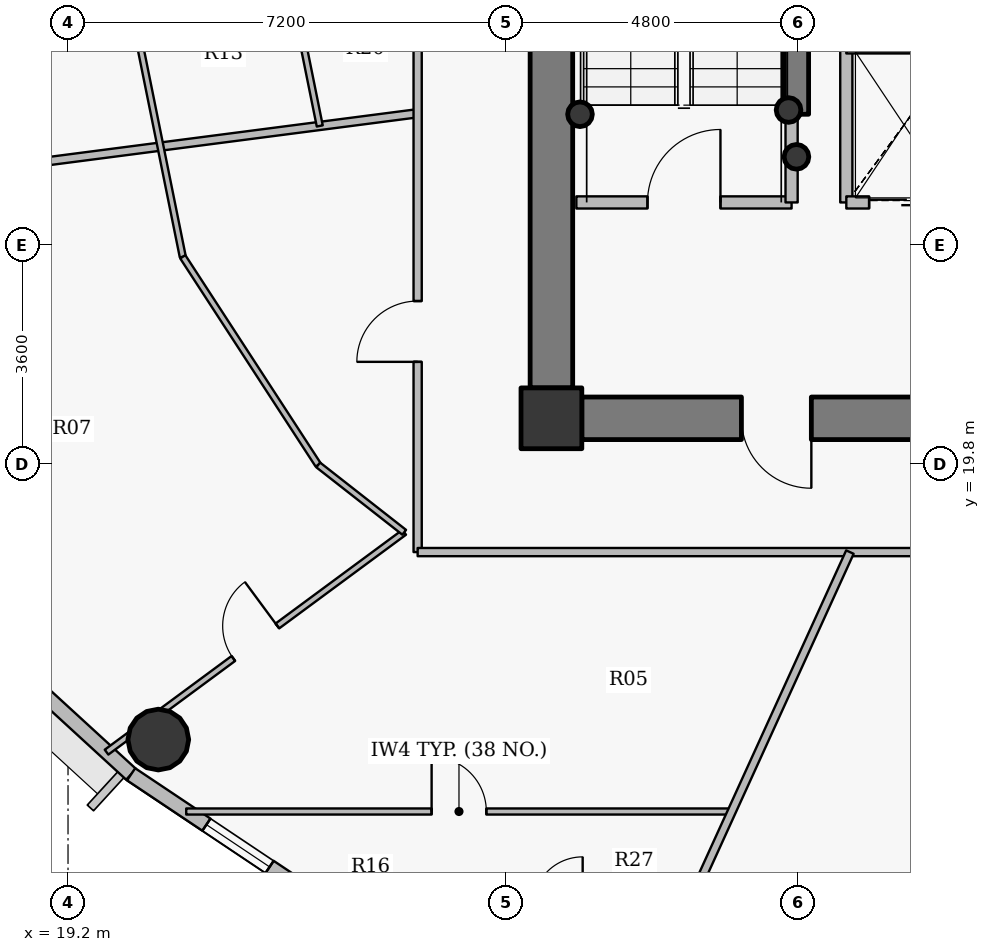
"""IFC4 building model, lengths in metres.
Left out: names, types, materials, properties, quantities, classifications, styles, units other than length and angle.
Written with IfcOpenShell. Run it as: python <this file> out.ifc"""

import sys

from ifc_helpers import new_model, si_unit, direction, frame, frame_2d, origin, origin_2d, place, context, subcontext, project, spatial, rectangle, hollow_circle, extrude, source, transform, mapped, element, fill, save


model = new_model("IFC4")
c1 = context("Model", 3, precision=1e-05, world=origin(), true_north=direction((0.0, 1.0)))
c2 = subcontext(c1, "Body", "Model", "MODEL_VIEW")
j1 = project(units=[si_unit("LENGTHUNIT", "METRE"), si_unit("PLANEANGLEUNIT", "RADIAN")], contexts=[c1])
p1 = place(None, origin())
s1 = spatial("IfcSite", under=j1, at=p1, CompositionType="ELEMENT")
p2 = place(p1, origin())
s2 = spatial("IfcBuilding", under=s1, at=p2, CompositionType="ELEMENT")
p3 = place(p2, frame((0.0, 0.0, 299.25)))
s3 = spatial("IfcBuildingStorey", under=s2, at=p3, CompositionType="ELEMENT", Elevation=299.25)
p4 = place(p3, frame((27.15, 20.55, 0.0), z_axis=(0.0, 0.0, 1.0), x_axis=(1.0, 0.0, 0.0)))
e1 = element("IfcColumn", 1, at=p4, inside=s3, PredefinedType="COLUMN", context=c2, shape_type="SweptSolid", body=[
    extrude(rectangle(XDim=1.0, YDim=1.0, at=origin_2d()), origin(), (0.0, 0.0, 1.0), 3.75),
])
for number, where, z_axis, x_axis in (
    (2, (31.05, 25.62, 0.0), (0.0, 0.0, 1.0), (1.0, 0.0, 0.0)),
    (3, (31.18, 24.85, 0.0), (0.0, 0.0, 1.0), (1.0, 0.0, 0.0)),
    (4, (27.62, 25.55, 0.0), (0.0, 0.0, 1.0), (1.0, 0.0, 0.0)),
):
    element("IfcColumn", number, at=place(p3, frame(where, z_axis=z_axis, x_axis=x_axis)), inside=s3, PredefinedType="COLUMN", context=c2, shape_type="SweptSolid", body=[
        extrude(hollow_circle(Radius=0.203, WallThickness=0.016, at=origin_2d()), origin(), (0.0, 0.0, 1.0), 3.75),
    ])
p5 = place(p3, frame((44.35, 20.55, 0.0), z_axis=(0.0, 0.0, 1.0), x_axis=(-1.0, 0.0, 0.0)))
e5 = element("IfcWall", 5, at=p5, inside=s3, PredefinedType="SHEAR", context=c2, shape_type="SweptSolid", body=[
    extrude(rectangle(XDim=16.7, YDim=0.7, at=frame_2d((8.35, 0.0))), origin(), (0.0, 0.0, 1.0), 3.05),
])
p6 = place(p5, frame((12.925, 0.0, 0.0)))
e6 = element("IfcOpeningElement", 6, at=p6, cuts=e5, PredefinedType="OPENING", context=c2, shape_type="SweptSolid", body=[
    extrude(rectangle(XDim=1.15, YDim=2.15, at=origin_2d()), frame((0.575, 0.36, 1.075), z_axis=(0.0, -1.0, 0.0), x_axis=(1.0, 0.0, 0.0)), (0.0, 0.0, 1.0), 0.72),
])
p7 = place(p5, frame((9.1, 0.0, 0.0)))
e7 = element("IfcOpeningElement", 7, at=p7, cuts=e5, PredefinedType="OPENING", context=c2, shape_type="SweptSolid", body=[
    extrude(rectangle(XDim=1.15, YDim=2.15, at=origin_2d()), frame((0.575, 0.36, 1.075), z_axis=(0.0, -1.0, 0.0), x_axis=(1.0, 0.0, 0.0)), (0.0, 0.0, 1.0), 0.72),
])
p8 = place(p3, frame((27.15, 21.05, 0.0), z_axis=(0.0, 0.0, 1.0), x_axis=(0.0, 1.0, 0.0)))
e8 = element("IfcWall", 8, at=p8, inside=s3, PredefinedType="SHEAR", context=c2, shape_type="SweptSolid", body=[
    extrude(rectangle(XDim=11.9, YDim=0.7, at=frame_2d((5.95, 0.0))), origin(), (0.0, 0.0, 1.0), 3.05),
])
p9 = place(p3, frame((31.18, 25.55, 0.0), z_axis=(0.0, 0.0, 1.0), x_axis=(0.0, 1.0, 0.0)))
e9 = element("IfcWall", 9, at=p9, inside=s3, PredefinedType="SHEAR", context=c2, shape_type="SweptSolid", body=[
    extrude(rectangle(XDim=2.25, YDim=0.4, at=frame_2d((1.125, 0.0))), origin(), (0.0, 0.0, 1.0), 3.1),
])
p10 = place(p3, frame((20.685, 15.267, 0.0), z_axis=(0.0, 0.0, 1.0), x_axis=(1.0, 0.0, 0.0)))
e10 = element("IfcColumn", 10, at=p10, inside=s3, PredefinedType="COLUMN", context=c2, shape_type="SweptSolid", body=[
    extrude(hollow_circle(Radius=0.5, WallThickness=0.032, at=origin_2d()), origin(), (0.0, 0.0, 1.0), 3.75),
])
p11 = place(p3, frame((20.238, 14.696, 0.0), z_axis=(0.0, 0.0, 1.0), x_axis=(-0.737068506972, 0.675818034703, 0.0)))
e11 = element("IfcWall", 11, at=p11, inside=s3, PredefinedType="SOLIDWALL", context=c2, shape_type="SweptSolid", body=[
    extrude(rectangle(XDim=3.077, YDim=0.24, at=frame_2d((1.539, 0.0))), origin(), (0.0, 0.0, 1.0), 3.5),
])
p12 = place(p3, frame((22.896, 12.918, 0.0), z_axis=(0.0, 0.0, 1.0), x_axis=(-0.831250592635, 0.55589787933, 0.0)))
e12 = element("IfcWall", 12, at=p12, inside=s3, PredefinedType="SOLIDWALL", context=c2, shape_type="SweptSolid", body=[
    extrude(rectangle(XDim=3.197, YDim=0.24, at=frame_2d((1.599, 0.0))), origin(), (0.0, 0.0, 1.0), 3.5),
])
p13 = place(p12, frame((0.458, 0.0, 0.9)))
e13 = element("IfcOpeningElement", 13, at=p13, cuts=e12, PredefinedType="OPENING", context=c2, shape_type="SweptSolid", body=[
    extrude(rectangle(XDim=1.25, YDim=1.65, at=origin_2d()), frame((0.625, 0.13, 0.825), z_axis=(0.0, -1.0, 0.0), x_axis=(1.0, 0.0, 0.0)), (0.0, 0.0, 1.0), 0.26),
])
p14 = place(p3, frame((14.033, 24.151, 0.0), z_axis=(0.0, 0.0, 1.0), x_axis=(0.99169266035, 0.128629963101, 0.0)))
e14 = element("IfcWall", 14, at=p14, inside=s3, PredefinedType="PARTITIONING", context=c2, shape_type="SweptSolid", body=[
    extrude(rectangle(XDim=11.009, YDim=0.135, at=frame_2d((5.504, 0.0))), origin(), (0.0, 0.0, 1.0), 2.985),
])
p15 = place(p3, frame((19.833, 15.06, 0.0), z_axis=(0.0, 0.0, 1.0), x_axis=(0.804387847123, 0.594104529019, 0.0)))
e15 = element("IfcWall", 15, at=p15, inside=s3, PredefinedType="PARTITIONING", context=c2, shape_type="SweptSolid", body=[
    extrude(rectangle(XDim=6.086, YDim=0.1, at=frame_2d((3.043, 0.0))), origin(), (0.0, 0.0, 1.0), 3.5),
])
p16 = place(p15, frame((2.593, 0.0, 0.0)))
e16 = element("IfcOpeningElement", 16, at=p16, cuts=e15, PredefinedType="OPENING", context=c2, shape_type="SweptSolid", body=[
    extrude(rectangle(XDim=0.9, YDim=2.1, at=origin_2d()), frame((0.45, 0.06, 1.05), z_axis=(0.0, -1.0, 0.0), x_axis=(1.0, 0.0, 0.0)), (0.0, 0.0, 1.0), 0.12),
])
p17 = place(p3, frame((20.32, 27.0, 0.0), z_axis=(0.0, 0.0, 1.0), x_axis=(0.198226068862, -0.980156327135, 0.0)))
e17 = element("IfcWall", 17, at=p17, inside=s3, PredefinedType="PARTITIONING", context=c2, shape_type="SweptSolid", body=[
    extrude(rectangle(XDim=3.871, YDim=0.1, at=frame_2d((1.936, 0.0))), origin(), (0.0, 0.0, 1.0), 3.035),
])
p18 = place(p3, frame((21.087, 23.206, 0.0), z_axis=(0.0, 0.0, 1.0), x_axis=(0.545435886628, -0.838152547916, 0.0)))
e18 = element("IfcWall", 18, at=p18, inside=s3, PredefinedType="PARTITIONING", context=c2, shape_type="SweptSolid", body=[
    extrude(rectangle(XDim=4.083, YDim=0.1, at=frame_2d((2.042, 0.0))), origin(), (0.0, 0.0, 1.0), 3.035),
])
p19 = place(p3, frame((21.144, 14.084, 0.0), z_axis=(0.0, 0.0, 1.0), x_axis=(1.0, 0.0, 0.0)))
e19 = element("IfcWall", 19, at=p19, inside=s3, PredefinedType="PARTITIONING", context=c2, shape_type="SweptSolid", body=[
    extrude(rectangle(XDim=8.971, YDim=0.1, at=frame_2d((4.486, 0.0))), origin(), (0.0, 0.0, 1.0), 2.985),
])
p20 = place(p19, frame((4.036, 0.0, 0.0)))
e20 = element("IfcOpeningElement", 20, at=p20, cuts=e19, PredefinedType="OPENING", context=c2, shape_type="SweptSolid", body=[
    extrude(rectangle(XDim=0.9, YDim=2.1, at=origin_2d()), frame((0.45, 0.06, 1.05), z_axis=(0.0, -1.0, 0.0), x_axis=(1.0, 0.0, 0.0)), (0.0, 0.0, 1.0), 0.12),
])
p21 = place(p3, frame((23.008, 27.0, 0.0), z_axis=(0.0, 0.0, 1.0), x_axis=(0.198189512146, -0.980163719628, 0.0)))
e21 = element("IfcWall", 21, at=p21, inside=s3, PredefinedType="PARTITIONING", context=c2, shape_type="SweptSolid", body=[
    extrude(rectangle(XDim=1.675, YDim=0.1, at=frame_2d((0.838, 0.0))), origin(), (0.0, 0.0, 1.0), 3.035),
])
p22 = place(p3, frame((23.315, 19.783, 0.0), z_axis=(0.0, 0.0, 1.0), x_axis=(0.787284128546, -0.616590383431, 0.0)))
e22 = element("IfcWall", 22, at=p22, inside=s3, PredefinedType="PARTITIONING", context=c2, shape_type="SweptSolid", body=[
    extrude(rectangle(XDim=1.796, YDim=0.1, at=frame_2d((0.898, 0.0))), origin(), (0.0, 0.0, 1.0), 3.5),
])
p23 = place(p3, frame((24.95, 18.35, 0.0), z_axis=(0.0, 0.0, 1.0), x_axis=(0.0, 1.0, 0.0)))
e23 = element("IfcWall", 23, at=p23, inside=s3, PredefinedType="PARTITIONING", context=c2, shape_type="SweptSolid", body=[
    extrude(rectangle(XDim=11.45, YDim=0.135, at=frame_2d((5.725, 0.0))), origin(), (0.0, 0.0, 1.0), 3.035),
])
p24 = place(p23, frame((3.128, 0.0, 0.0)))
e24 = element("IfcOpeningElement", 24, at=p24, cuts=e23, PredefinedType="OPENING", context=c2, shape_type="SweptSolid", body=[
    extrude(rectangle(XDim=1.0, YDim=2.15, at=origin_2d()), frame((0.5, 0.078, 1.075), z_axis=(0.0, -1.0, 0.0), x_axis=(1.0, 0.0, 0.0)), (0.0, 0.0, 1.0), 0.155),
])
p25 = place(p3, frame((24.95, 18.35, 0.0), z_axis=(0.0, 0.0, 1.0), x_axis=(1.0, 0.0, 0.0)))
e25 = element("IfcWall", 25, at=p25, inside=s3, PredefinedType="PARTITIONING", context=c2, shape_type="SweptSolid", body=[
    extrude(rectangle(XDim=22.1, YDim=0.135, at=frame_2d((11.05, 0.0))), origin(), (0.0, 0.0, 1.0), 3.035),
])
p26 = place(p25, frame((8.131, 0.0, 0.0)))
e26 = element("IfcOpeningElement", 26, at=p26, cuts=e25, PredefinedType="OPENING", context=c2, shape_type="SweptSolid", body=[
    extrude(rectangle(XDim=1.0, YDim=2.15, at=origin_2d()), frame((0.5, 0.078, 1.075), z_axis=(0.0, -1.0, 0.0), x_axis=(1.0, 0.0, 0.0)), (0.0, 0.0, 1.0), 0.155),
])
p27 = place(p25, frame((19.081, 0.0, 0.0)))
e27 = element("IfcOpeningElement", 27, at=p27, cuts=e25, PredefinedType="OPENING", context=c2, shape_type="SweptSolid", body=[
    extrude(rectangle(XDim=1.0, YDim=2.15, at=origin_2d()), frame((0.5, 0.078, 1.075), z_axis=(0.0, -1.0, 0.0), x_axis=(1.0, 0.0, 0.0)), (0.0, 0.0, 1.0), 0.155),
])
p28 = place(p3, frame((27.56, 24.1, 0.0), z_axis=(0.0, 0.0, 1.0), x_axis=(1.0, 0.0, 0.0)))
e28 = element("IfcWall", 28, at=p28, inside=s3, PredefinedType="PARTITIONING", context=c2, shape_type="SweptSolid", body=[
    extrude(rectangle(XDim=3.54, YDim=0.2, at=frame_2d((1.77, 0.0))), origin(), (0.0, 0.0, 1.0), 3.5),
])
p29 = place(p28, frame((1.17, 0.0, 0.0)))
e29 = element("IfcOpeningElement", 29, at=p29, cuts=e28, PredefinedType="OPENING", context=c2, shape_type="SweptSolid", body=[
    extrude(rectangle(XDim=1.2, YDim=2.15, at=origin_2d()), frame((0.6, 0.11, 1.075), z_axis=(0.0, -1.0, 0.0), x_axis=(1.0, 0.0, 0.0)), (0.0, 0.0, 1.0), 0.22),
])
p30 = place(p3, frame((28.537, 10.62, 0.0), z_axis=(0.0, 0.0, 1.0), x_axis=(0.414582330606, 0.910011808247, 0.0)))
e30 = element("IfcWall", 30, at=p30, inside=s3, PredefinedType="PARTITIONING", context=c2, shape_type="SweptSolid", body=[
    extrude(rectangle(XDim=8.495, YDim=0.135, at=frame_2d((4.247, 0.0))), origin(), (0.0, 0.0, 1.0), 2.985),
])
p31 = place(p3, frame((31.1, 24.1, 0.0), z_axis=(0.0, 0.0, 1.0), x_axis=(0.0, 1.0, 0.0)))
e31 = element("IfcWall", 31, at=p31, inside=s3, PredefinedType="PARTITIONING", context=c2, shape_type="SweptSolid", body=[
    extrude(rectangle(XDim=1.44, YDim=0.2, at=frame_2d((0.72, 0.0))), origin(), (0.0, 0.0, 1.0), 3.5),
])
p32 = place(p3, frame((32.0, 24.1, 0.0), z_axis=(0.0, 0.0, 1.0), x_axis=(0.0, 1.0, 0.0)))
e32 = element("IfcWall", 32, at=p32, inside=s3, PredefinedType="PARTITIONING", context=c2, shape_type="SweptSolid", body=[
    extrude(rectangle(XDim=3.45, YDim=0.2, at=frame_2d((1.725, 0.0))), origin(), (0.0, 0.0, 1.0), 3.5),
])
p33 = place(p3, frame((32.0, 24.1, 0.0), z_axis=(0.0, 0.0, 1.0), x_axis=(1.0, 0.0, 0.0)))
e33 = element("IfcWall", 33, at=p33, inside=s3, PredefinedType="PARTITIONING", context=c2, shape_type="SweptSolid", body=[
    extrude(rectangle(XDim=1.9, YDim=0.2, at=frame_2d((0.95, 0.0))), origin(), (0.0, 0.0, 1.0), 3.085),
])
p34 = place(p33, frame((0.375, 0.0, 0.0)))
e34 = element("IfcOpeningElement", 34, at=p34, cuts=e33, PredefinedType="OPENING", context=c2, shape_type="SweptSolid", body=[
    extrude(rectangle(XDim=1.15, YDim=2.15, at=origin_2d()), frame((0.575, 0.11, 1.075), z_axis=(0.0, -1.0, 0.0), x_axis=(1.0, 0.0, 0.0)), (0.0, 0.0, 1.0), 0.22),
])
p35 = place(p3, frame((32.0, 26.65, 0.0), z_axis=(0.0, 0.0, 1.0), x_axis=(1.0, 0.0, 0.0)))
e35 = element("IfcWall", 35, at=p35, inside=s3, PredefinedType="PARTITIONING", context=c2, shape_type="SweptSolid", body=[
    extrude(rectangle(XDim=1.9, YDim=0.2, at=frame_2d((0.95, 0.0))), origin(), (0.0, 0.0, 1.0), 3.085),
])
p36 = place(p3, frame((26.8, 21.04, 0.0), z_axis=(0.0, 0.0, 1.0), x_axis=(0.0, -1.0, 0.0)))
e36 = element("IfcWall", 36, at=p36, inside=s3, PredefinedType="PARTITIONING", context=c2, shape_type="SweptSolid", body=[
    extrude(rectangle(XDim=0.84, YDim=0.135, at=frame_2d((0.42, 0.0))), origin(), (0.0, 0.0, 1.0), 3.035),
])
p37 = place(p3, frame((27.107, 20.2, 0.0), z_axis=(0.0, 0.0, 1.0), x_axis=(1.0, 0.0, 0.0)))
e37 = element("IfcWall", 37, at=p37, inside=s3, PredefinedType="PARTITIONING", context=c2, shape_type="SweptSolid", body=[
    extrude(rectangle(XDim=0.532, YDim=0.135, at=frame_2d((0.266, 0.0))), origin(), (0.0, 0.0, 1.0), 3.035),
])
m1 = source(origin(), c2, "Body", "SweptSolid", [
    extrude(rectangle(XDim=1.25, YDim=1.65, at=origin_2d()), frame((0.625, 0.03, 0.825), z_axis=(0.0, -1.0, 0.0), x_axis=(1.0, 0.0, 0.0)), (0.0, 0.0, 1.0), 0.06),
])
p38 = place(p13, origin())
e38 = element("IfcWindow", 38, at=p38, inside=s3, PartitioningType="SINGLE_PANEL", PredefinedType="WINDOW", context=c2, shape_type="MappedRepresentation", body=[
    mapped(m1, transform((0.0, 0.0, 0.0), x_axis=(1.0, 0.0, 0.0), y_axis=(0.0, 1.0, 0.0), z_axis=(0.0, 0.0, 1.0), scale=1.0)),
])
fill(e13, e38)
m2 = source(origin(), c2, "Body", "SweptSolid", [
    extrude(rectangle(XDim=1.15, YDim=2.15, at=origin_2d()), frame((0.575, 0.025, 1.075), z_axis=(0.0, -1.0, 0.0), x_axis=(1.0, 0.0, 0.0)), (0.0, 0.0, 1.0), 0.05),
])
p39 = place(p6, origin())
e39 = element("IfcDoor", 39, at=p39, inside=s3, OperationType="SINGLE_SWING_LEFT", PredefinedType="DOOR", context=c2, shape_type="MappedRepresentation", body=[
    mapped(m2, transform((0.0, 0.0, 0.0), x_axis=(1.0, 0.0, 0.0), y_axis=(0.0, 1.0, 0.0), z_axis=(0.0, 0.0, 1.0), scale=1.0)),
])
fill(e6, e39)
m3 = source(origin(), c2, "Body", "SweptSolid", [
    extrude(rectangle(XDim=1.2, YDim=2.15, at=origin_2d()), frame((0.6, 0.025, 1.075), z_axis=(0.0, -1.0, 0.0), x_axis=(1.0, 0.0, 0.0)), (0.0, 0.0, 1.0), 0.05),
])
p40 = place(p29, origin())
e40 = element("IfcDoor", 40, at=p40, inside=s3, OperationType="SINGLE_SWING_RIGHT", PredefinedType="DOOR", context=c2, shape_type="MappedRepresentation", body=[
    mapped(m3, transform((0.0, 0.0, 0.0), x_axis=(1.0, 0.0, 0.0), y_axis=(0.0, 1.0, 0.0), z_axis=(0.0, 0.0, 1.0), scale=1.0)),
])
fill(e29, e40)
m4 = source(origin(), c2, "Body", "SweptSolid", [
    extrude(rectangle(XDim=1.15, YDim=2.15, at=origin_2d()), frame((0.575, 0.025, 1.075), z_axis=(0.0, -1.0, 0.0), x_axis=(1.0, 0.0, 0.0)), (0.0, 0.0, 1.0), 0.05),
])
p41 = place(p34, origin())
e41 = element("IfcDoor", 41, at=p41, inside=s3, OperationType="DOUBLE_DOOR_SLIDING", PredefinedType="USERDEFINED", context=c2, shape_type="MappedRepresentation", body=[
    mapped(m4, transform((0.0, 0.0, 0.0), x_axis=(1.0, 0.0, 0.0), y_axis=(0.0, 1.0, 0.0), z_axis=(0.0, 0.0, 1.0), scale=1.0)),
])
fill(e34, e41)
m5 = source(origin(), c2, "Body", "SweptSolid", [
    extrude(rectangle(XDim=1.0, YDim=2.15, at=origin_2d()), frame((0.5, 0.025, 1.075), z_axis=(0.0, -1.0, 0.0), x_axis=(1.0, 0.0, 0.0)), (0.0, 0.0, 1.0), 0.05),
])
p42 = place(p24, origin())
e42 = element("IfcDoor", 42, at=p42, inside=s3, OperationType="SINGLE_SWING_LEFT", PredefinedType="DOOR", context=c2, shape_type="MappedRepresentation", body=[
    mapped(m5, transform((0.0, 0.0, 0.0), x_axis=(1.0, 0.0, 0.0), y_axis=(0.0, 1.0, 0.0), z_axis=(0.0, 0.0, 1.0), scale=1.0)),
])
fill(e24, e42)
m6 = source(origin(), c2, "Body", "SweptSolid", [
    extrude(rectangle(XDim=0.9, YDim=2.1, at=origin_2d()), frame((0.45, 0.025, 1.05), z_axis=(0.0, -1.0, 0.0), x_axis=(1.0, 0.0, 0.0)), (0.0, 0.0, 1.0), 0.05),
])
p43 = place(p16, origin())
e43 = element("IfcDoor", 43, at=p43, inside=s3, OperationType="SINGLE_SWING_RIGHT", PredefinedType="DOOR", context=c2, shape_type="MappedRepresentation", body=[
    mapped(m6, transform((0.0, 0.0, 0.0), x_axis=(1.0, 0.0, 0.0), y_axis=(0.0, 1.0, 0.0), z_axis=(0.0, 0.0, 1.0), scale=1.0)),
])
fill(e16, e43)
p44 = place(p20, origin())
e44 = element("IfcDoor", 44, at=p44, inside=s3, OperationType="SINGLE_SWING_LEFT", PredefinedType="DOOR", context=c2, shape_type="MappedRepresentation", body=[
    mapped(m6, transform((0.0, 0.0, 0.0), x_axis=(1.0, 0.0, 0.0), y_axis=(0.0, 1.0, 0.0), z_axis=(0.0, 0.0, 1.0), scale=1.0)),
])
fill(e20, e44)
save(model, sys.argv[1])
